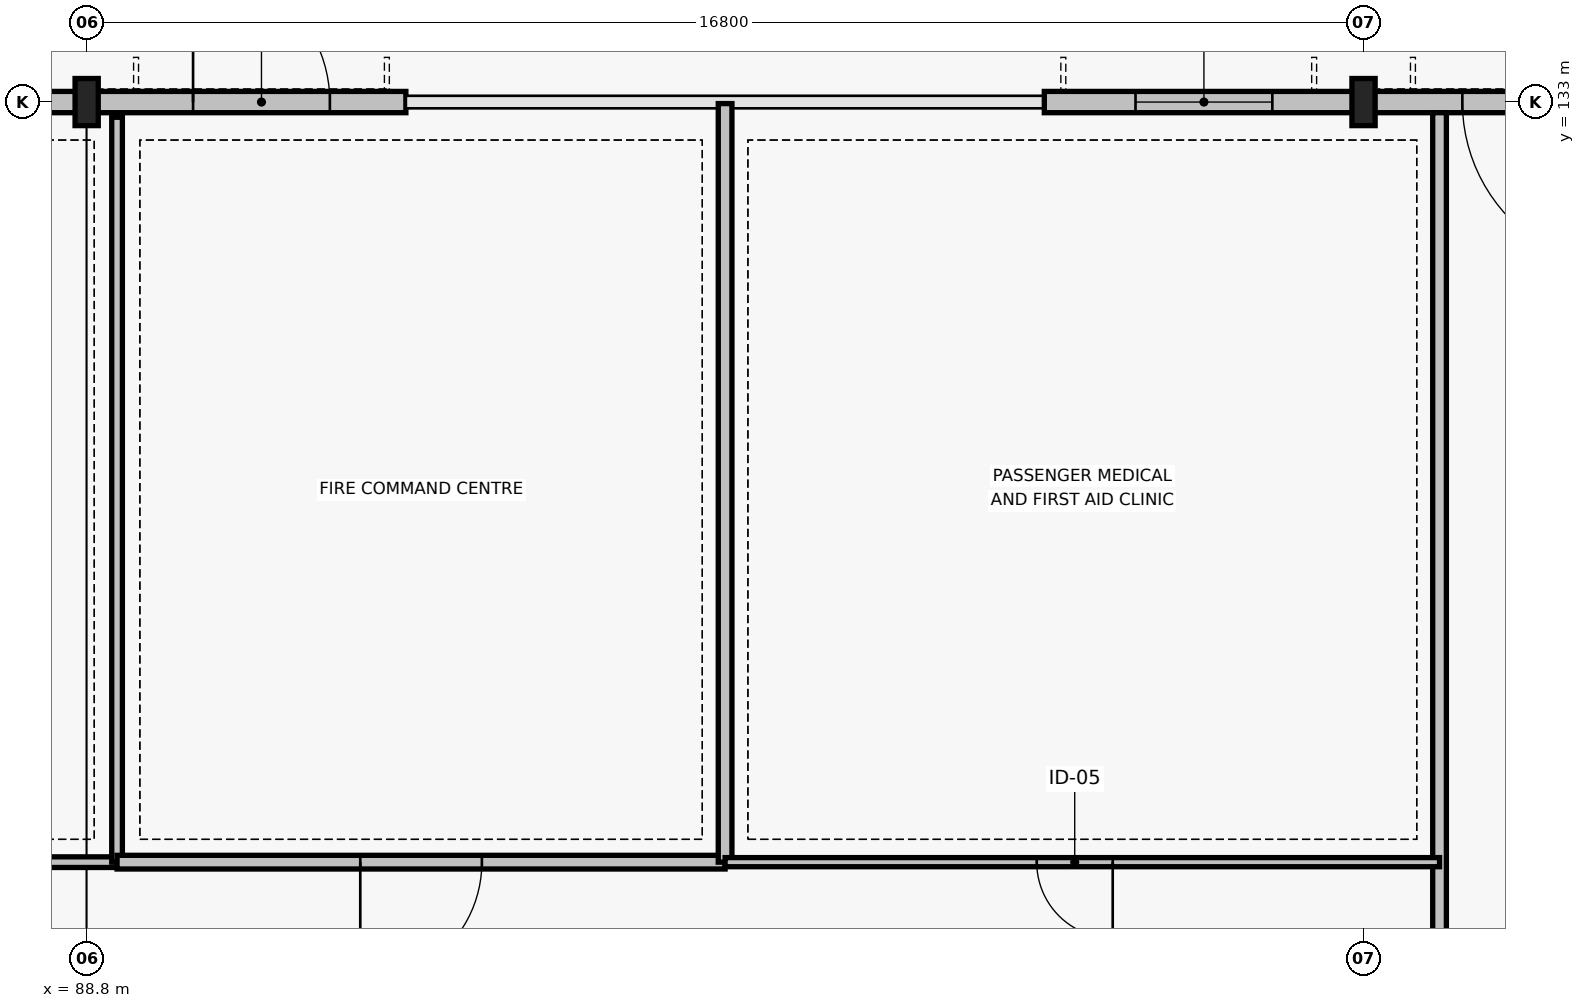
"""IFC4 building model, lengths in metres.
Left out: names, types, materials, properties, quantities, classifications, styles, units other than length and angle.
Written with IfcOpenShell. Run it as: python <this file> out.ifc"""

import sys

from ifc_helpers import new_model, si_unit, direction, frame, frame_2d, origin, origin_2d, place, context, subcontext, project, spatial, rectangle, i_section, extrude, element, fill, save


model = new_model("IFC4")
c1 = context("Model", 3, precision=1e-05, world=origin(), true_north=direction((0.0, 1.0)))
c2 = subcontext(c1, "Body", "Model", "MODEL_VIEW")
j1 = project(units=[si_unit("LENGTHUNIT", "METRE"), si_unit("PLANEANGLEUNIT", "RADIAN")], contexts=[c1])
p1 = place(None, origin())
s1 = spatial("IfcSite", under=j1, at=p1, CompositionType="ELEMENT")
p2 = place(p1, origin())
s2 = spatial("IfcBuilding", under=s1, at=p2, CompositionType="ELEMENT")
p3 = place(p2, origin())
s3 = spatial("IfcBuildingStorey", under=s2, at=p3, CompositionType="ELEMENT", Elevation=0.0)
for number, where, z_axis, x_axis in (
    (1, (88.8, 133.0, 0.0), (0.0, 0.0, 1.0), (1.0, 0.0, 0.0)),
    (2, (105.6, 133.0, 0.0), (0.0, 0.0, 1.0), (1.0, 0.0, 0.0)),
):
    element("IfcColumn", number, at=place(p3, frame(where, z_axis=z_axis, x_axis=x_axis)), inside=s3, PredefinedType="COLUMN", context=c2, shape_type="SweptSolid", body=[
        extrude(i_section(OverallWidth=0.305, OverallDepth=0.62, WebThickness=0.021, FlangeThickness=0.04, FilletRadius=0.027, at=origin_2d()), origin(), (0.0, 0.0, 1.0), 5.4),
    ])
p4 = place(p3, frame((84.6, 133.0, 0.0), z_axis=(0.0, 0.0, 1.0), x_axis=(1.0, 0.0, 0.0)))
e3 = element("IfcWall", 3, at=p4, inside=s3, PredefinedType="STANDARD", context=c2, shape_type="SweptSolid", body=[
    extrude(rectangle(XDim=4.2, YDim=0.28, at=frame_2d((2.1, 0.0))), origin(), (0.0, 0.0, 1.0), 4.765),
])
p5 = place(p4, frame((1.05, 0.0, 0.8)))
e4 = element("IfcOpeningElement", 4, at=p5, cuts=e3, PredefinedType="OPENING", context=c2, shape_type="SweptSolid", body=[
    extrude(rectangle(XDim=2.1, YDim=2.05, at=frame_2d((1.05, 1.025))), frame((0.0, 0.15, 0.0), z_axis=(0.0, -1.0, 0.0), x_axis=(1.0, 0.0, 0.0)), (0.0, 0.0, 1.0), 0.3),
])
p6 = place(p3, frame((88.8, 133.0, 0.0), z_axis=(0.0, 0.0, 1.0), x_axis=(1.0, 0.0, 0.0)))
e5 = element("IfcWall", 5, at=p6, inside=s3, PredefinedType="STANDARD", context=c2, shape_type="SweptSolid", body=[
    extrude(rectangle(XDim=4.2, YDim=0.28, at=frame_2d((2.1, 0.0))), origin(), (0.0, 0.0, 1.0), 4.765),
])
p7 = place(p6, frame((1.4, 0.0, 0.0)))
e6 = element("IfcOpeningElement", 6, at=p7, cuts=e5, PredefinedType="OPENING", context=c2, shape_type="SweptSolid", body=[
    extrude(rectangle(XDim=1.8, YDim=2.3, at=frame_2d((0.9, 1.15))), frame((0.0, 0.15, 0.0), z_axis=(0.0, -1.0, 0.0), x_axis=(1.0, 0.0, 0.0)), (0.0, 0.0, 1.0), 0.3),
])
p8 = place(p3, frame((101.4, 133.0, 0.0), z_axis=(0.0, 0.0, 1.0), x_axis=(1.0, 0.0, 0.0)))
e7 = element("IfcWall", 7, at=p8, inside=s3, PredefinedType="STANDARD", context=c2, shape_type="SweptSolid", body=[
    extrude(rectangle(XDim=4.2, YDim=0.28, at=frame_2d((2.1, 0.0))), origin(), (0.0, 0.0, 1.0), 4.765),
])
p9 = place(p8, frame((1.2, 0.0, 0.8)))
e8 = element("IfcOpeningElement", 8, at=p9, cuts=e7, PredefinedType="OPENING", context=c2, shape_type="SweptSolid", body=[
    extrude(rectangle(XDim=1.8, YDim=2.05, at=frame_2d((0.9, 1.025))), frame((0.0, 0.15, 0.0), z_axis=(0.0, -1.0, 0.0), x_axis=(1.0, 0.0, 0.0)), (0.0, 0.0, 1.0), 0.3),
])
p10 = place(p3, frame((105.6, 133.0, 0.0), z_axis=(0.0, 0.0, 1.0), x_axis=(1.0, 0.0, 0.0)))
e9 = element("IfcWall", 9, at=p10, inside=s3, PredefinedType="STANDARD", context=c2, shape_type="SweptSolid", body=[
    extrude(rectangle(XDim=4.2, YDim=0.28, at=frame_2d((2.1, 0.0))), origin(), (0.0, 0.0, 1.0), 4.765),
])
p11 = place(p10, frame((1.3, 0.0, 0.0)))
e10 = element("IfcOpeningElement", 10, at=p11, cuts=e9, PredefinedType="OPENING", context=c2, shape_type="SweptSolid", body=[
    extrude(rectangle(XDim=2.2, YDim=2.4, at=frame_2d((1.1, 1.2))), frame((0.0, 0.15, 0.0), z_axis=(0.0, -1.0, 0.0), x_axis=(1.0, 0.0, 0.0)), (0.0, 0.0, 1.0), 0.3),
])
p12 = place(p3, frame((106.6, 132.86, 0.0), z_axis=(0.0, 0.0, 1.0), x_axis=(0.0, -1.0, 0.0)))
e11 = element("IfcWall", 11, at=p12, inside=s3, PredefinedType="PARTITIONING", context=c2, shape_type="SweptSolid", body=[
    extrude(rectangle(XDim=23.26, YDim=0.18, at=frame_2d((11.63, 0.0))), origin(), (0.0, 0.0, 1.0), 5.16),
])
p13 = place(p3, frame((77.2, 123.0, 0.0), z_axis=(0.0, 0.0, 1.0), x_axis=(1.0, 0.0, 0.0)))
e12 = element("IfcWall", 12, at=p13, inside=s3, PredefinedType="PARTITIONING", context=c2, shape_type="SweptSolid", body=[
    extrude(rectangle(XDim=12.0, YDim=0.14, at=frame_2d((6.0, 0.0))), origin(), (0.0, 0.0, 1.0), 5.16),
])
p14 = place(p13, frame((5.4, 0.0, 0.0)))
e13 = element("IfcOpeningElement", 13, at=p14, cuts=e12, PredefinedType="OPENING", context=c2, shape_type="SweptSolid", body=[
    extrude(rectangle(XDim=1.2, YDim=2.2, at=frame_2d((0.6, 1.1))), frame((0.0, 0.08, 0.0), z_axis=(0.0, -1.0, 0.0), x_axis=(1.0, 0.0, 0.0)), (0.0, 0.0, 1.0), 0.16),
])
p15 = place(p3, frame((89.2, 123.0, 0.0), z_axis=(0.0, 0.0, 1.0), x_axis=(0.0, 1.0, 0.0)))
e14 = element("IfcWall", 14, at=p15, inside=s3, PredefinedType="PARTITIONING", context=c2, shape_type="SweptSolid", body=[
    extrude(rectangle(XDim=9.8, YDim=0.14, at=frame_2d((4.9, 0.0))), origin(), (0.0, 0.0, 1.0), 4.655),
])
p16 = place(p3, frame((89.2, 123.0, 0.0), z_axis=(0.0, 0.0, 1.0), x_axis=(1.0, 0.0, 0.0)))
e15 = element("IfcWall", 15, at=p16, inside=s3, PredefinedType="PARTITIONING", context=c2, shape_type="SweptSolid", body=[
    extrude(rectangle(XDim=8.0, YDim=0.18, at=frame_2d((4.0, 0.0))), origin(), (0.0, 0.0, 1.0), 5.16),
])
p17 = place(p16, frame((4.8, 0.0, 0.0), z_axis=(0.0, 0.0, 1.0), x_axis=(-1.0, 0.0, 0.0)))
e16 = element("IfcOpeningElement", 16, at=p17, cuts=e15, PredefinedType="OPENING", context=c2, shape_type="SweptSolid", body=[
    extrude(rectangle(XDim=1.6, YDim=2.25, at=frame_2d((0.8, 1.125))), frame((0.0, 0.1, 0.0), z_axis=(0.0, -1.0, 0.0), x_axis=(1.0, 0.0, 0.0)), (0.0, 0.0, 1.0), 0.2),
])
p18 = place(p3, frame((97.2, 123.0, 0.0), z_axis=(0.0, 0.0, 1.0), x_axis=(0.0, 1.0, 0.0)))
e17 = element("IfcWall", 17, at=p18, inside=s3, PredefinedType="PARTITIONING", context=c2, shape_type="SweptSolid", body=[
    extrude(rectangle(XDim=9.98, YDim=0.18, at=frame_2d((4.99, 0.0))), origin(), (0.0, 0.0, 1.0), 5.16),
])
p19 = place(p3, frame((97.2, 123.0, 0.0), z_axis=(0.0, 0.0, 1.0), x_axis=(1.0, 0.0, 0.0)))
e18 = element("IfcWall", 18, at=p19, inside=s3, PredefinedType="PARTITIONING", context=c2, shape_type="SweptSolid", body=[
    extrude(rectangle(XDim=9.4, YDim=0.12, at=frame_2d((4.7, 0.0))), origin(), (0.0, 0.0, 1.0), 5.16),
])
p20 = place(p19, frame((4.1, 0.0, 0.0)))
e19 = element("IfcOpeningElement", 19, at=p20, cuts=e18, PredefinedType="OPENING", context=c2, shape_type="SweptSolid", body=[
    extrude(rectangle(XDim=1.0, YDim=2.15, at=frame_2d((0.5, 1.075))), frame((0.0, 0.07, 0.0), z_axis=(0.0, -1.0, 0.0), x_axis=(1.0, 0.0, 0.0)), (0.0, 0.0, 1.0), 0.14),
])
p21 = place(p7, origin())
e20 = element("IfcDoor", 20, at=p21, inside=s3, OperationType="SINGLE_SWING_LEFT", PredefinedType="DOOR", context=c2, shape_type="SweptSolid", body=[
    extrude(rectangle(XDim=1.8, YDim=2.3, at=frame_2d((0.9, 1.15))), frame((0.0, 0.025, 0.0), z_axis=(0.0, -1.0, 0.0), x_axis=(1.0, 0.0, 0.0)), (0.0, 0.0, 1.0), 0.05),
])
fill(e6, e20)
p22 = place(p9, origin())
e21 = element("IfcWindow", 21, at=p22, inside=s3, PartitioningType="SINGLE_PANEL", PredefinedType="WINDOW", context=c2, shape_type="SweptSolid", body=[
    extrude(rectangle(XDim=1.8, YDim=2.05, at=frame_2d((0.9, 1.025))), frame((0.0, 0.03, 0.0), z_axis=(0.0, -1.0, 0.0), x_axis=(1.0, 0.0, 0.0)), (0.0, 0.0, 1.0), 0.06),
])
fill(e8, e21)
p23 = place(p11, origin())
e22 = element("IfcDoor", 22, at=p23, inside=s3, OperationType="SINGLE_SWING_RIGHT", PredefinedType="DOOR", context=c2, shape_type="SweptSolid", body=[
    extrude(rectangle(XDim=2.2, YDim=2.4, at=frame_2d((1.1, 1.2))), frame((0.0, 0.025, 0.0), z_axis=(0.0, -1.0, 0.0), x_axis=(1.0, 0.0, 0.0)), (0.0, 0.0, 1.0), 0.05),
])
fill(e10, e22)
p24 = place(p17, origin())
e23 = element("IfcDoor", 23, at=p24, inside=s3, OperationType="SINGLE_SWING_LEFT", PredefinedType="DOOR", context=c2, shape_type="SweptSolid", body=[
    extrude(rectangle(XDim=1.6, YDim=2.25, at=frame_2d((0.8, 1.125))), frame((0.0, 0.025, 0.0), z_axis=(0.0, -1.0, 0.0), x_axis=(1.0, 0.0, 0.0)), (0.0, 0.0, 1.0), 0.05),
])
fill(e16, e23)
p25 = place(p20, origin())
e24 = element("IfcDoor", 24, at=p25, inside=s3, OperationType="SINGLE_SWING_RIGHT", PredefinedType="DOOR", context=c2, shape_type="SweptSolid", body=[
    extrude(rectangle(XDim=1.0, YDim=2.15, at=frame_2d((0.5, 1.075))), frame((0.0, 0.025, 0.0), z_axis=(0.0, -1.0, 0.0), x_axis=(1.0, 0.0, 0.0)), (0.0, 0.0, 1.0), 0.05),
])
fill(e19, e24)
save(model, sys.argv[1])
